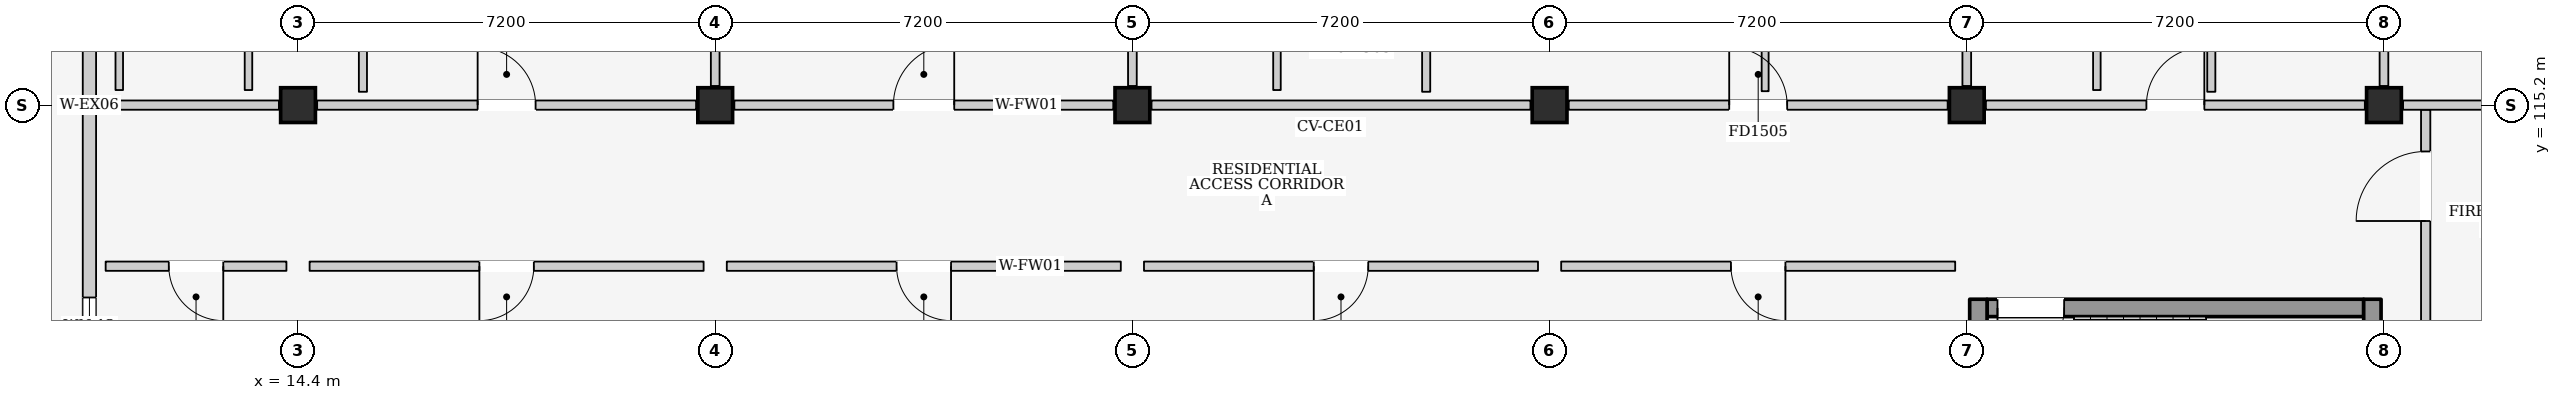
"""IFC4 building model, lengths in metres.
Left out: names, types, materials, properties, quantities, classifications, styles, units other than length and angle.
Written with IfcOpenShell. Run it as: python <this file> out.ifc"""

import sys

from ifc_helpers import new_model, si_unit, direction, frame, frame_2d, origin, origin_2d, place, context, subcontext, project, spatial, rectangle, extrude, element, fill, save


model = new_model("IFC4")
c1 = context("Model", 3, precision=1e-05, world=origin(), true_north=direction((0.0, 1.0)))
c2 = subcontext(c1, "Body", "Model", "MODEL_VIEW")
j1 = project(units=[si_unit("LENGTHUNIT", "METRE"), si_unit("PLANEANGLEUNIT", "RADIAN")], contexts=[c1])
p1 = place(None, origin())
s1 = spatial("IfcSite", under=j1, at=p1, CompositionType="ELEMENT")
p2 = place(p1, origin())
s2 = spatial("IfcBuilding", under=s1, at=p2, CompositionType="ELEMENT")
p3 = place(p2, frame((0.0, 0.0, 25.1)))
s3 = spatial("IfcBuildingStorey", under=s2, at=p3, CompositionType="ELEMENT", Elevation=25.1)
for number, where, z_axis, x_axis in (
    (1, (14.4, 115.2, 0.0), (0.0, 0.0, 1.0), (1.0, 0.0, 0.0)),
    (2, (21.6, 115.2, 0.0), (0.0, 0.0, 1.0), (1.0, 0.0, 0.0)),
    (3, (28.8, 115.2, 0.0), (0.0, 0.0, 1.0), (1.0, 0.0, 0.0)),
    (4, (36.0, 115.2, 0.0), (0.0, 0.0, 1.0), (1.0, 0.0, 0.0)),
    (5, (43.2, 115.2, 0.0), (0.0, 0.0, 1.0), (1.0, 0.0, 0.0)),
    (6, (50.4, 115.2, 0.0), (0.0, 0.0, 1.0), (1.0, 0.0, 0.0)),
):
    element("IfcColumn", number, at=place(p3, frame(where, z_axis=z_axis, x_axis=x_axis)), inside=s3, PredefinedType="COLUMN", context=c2, shape_type="SweptSolid", body=[
        extrude(rectangle(XDim=0.6, YDim=0.6, at=origin_2d()), origin(), (0.0, 0.0, 1.0), 3.2),
    ])
p4 = place(p3, frame((10.8, 108.13, 0.0), z_axis=(0.0, 0.0, 1.0), x_axis=(0.0, 1.0, 0.0)))
e7 = element("IfcWall", 7, at=p4, inside=s3, PredefinedType="ELEMENTEDWALL", context=c2, shape_type="SweptSolid", body=[
    extrude(rectangle(XDim=7.07, YDim=0.23, at=frame_2d((3.535, 0.0))), origin(), (0.0, 0.0, 1.0), 2.425),
])
p5 = place(p4, frame((2.75, 0.0, 1.1)))
e8 = element("IfcOpeningElement", 8, at=p5, cuts=e7, PredefinedType="OPENING", context=c2, shape_type="SweptSolid", body=[
    extrude(rectangle(XDim=1.0, YDim=0.9, at=frame_2d((0.5, 0.45))), frame((0.0, 0.13, 0.0), z_axis=(0.0, -1.0, 0.0), x_axis=(1.0, 0.0, 0.0)), (0.0, 0.0, 1.0), 0.26),
])
p6 = place(p3, frame((10.8, 115.2, 0.0), z_axis=(0.0, 0.0, 1.0), x_axis=(0.0, 1.0, 0.0)))
e9 = element("IfcWall", 9, at=p6, inside=s3, PredefinedType="ELEMENTEDWALL", context=c2, shape_type="SweptSolid", body=[
    extrude(rectangle(XDim=7.07, YDim=0.23, at=frame_2d((3.535, 0.0))), origin(), (0.0, 0.0, 1.0), 2.425),
])
p7 = place(p6, frame((3.6, 0.0, 0.0)))
e10 = element("IfcOpeningElement", 10, at=p7, cuts=e9, PredefinedType="OPENING", context=c2, shape_type="SweptSolid", body=[
    extrude(rectangle(XDim=1.08, YDim=2.12, at=frame_2d((0.54, 1.06))), frame((0.0, 0.13, 0.0), z_axis=(0.0, -1.0, 0.0), x_axis=(1.0, 0.0, 0.0)), (0.0, 0.0, 1.0), 0.26),
])
p8 = place(p3, frame((43.55, 111.7, 0.0), z_axis=(0.0, 0.0, 1.0), x_axis=(1.0, 0.0, 0.0)))
e11 = element("IfcWall", 11, at=p8, inside=s3, PredefinedType="SHEAR", context=c2, shape_type="SweptSolid", body=[
    extrude(rectangle(XDim=6.5, YDim=0.3, at=frame_2d((3.25, 0.0))), origin(), (0.0, 0.0, 1.0), 2.99),
])
p9 = place(p8, frame((0.18, 0.0, 0.0)))
e12 = element("IfcOpeningElement", 12, at=p9, cuts=e11, PredefinedType="OPENING", context=c2, shape_type="SweptSolid", body=[
    extrude(rectangle(XDim=1.15, YDim=2.2, at=frame_2d((0.575, 1.1))), frame((0.0, 0.165, 0.0), z_axis=(0.0, -1.0, 0.0), x_axis=(1.0, 0.0, 0.0)), (0.0, 0.0, 1.0), 0.33),
])
for number, where, z_axis, x_axis in (
    (13, (43.4, 108.15, 0.0), (0.0, 0.0, 1.0), (0.0, 1.0, 0.0)),
    (14, (50.2, 108.15, 0.0), (0.0, 0.0, 1.0), (0.0, 1.0, 0.0)),
):
    element("IfcWall", number, at=place(p3, frame(where, z_axis=z_axis, x_axis=x_axis)), inside=s3, PredefinedType="SHEAR", context=c2, shape_type="SweptSolid", body=[
        extrude(rectangle(XDim=3.7, YDim=0.3, at=frame_2d((1.85, 0.0))), origin(), (0.0, 0.0, 1.0), 2.99),
    ])
p10 = place(p3, frame((51.12, 111.1, 0.0), z_axis=(0.0, 0.0, 1.0), x_axis=(0.0, 1.0, 0.0)))
e15 = element("IfcWall", 15, at=p10, inside=s3, PredefinedType="PARTITIONING", context=c2, shape_type="SweptSolid", body=[
    extrude(rectangle(XDim=4.02, YDim=0.16, at=frame_2d((2.01, 0.0))), origin(), (0.0, 0.0, 1.0), 2.99),
])
p11 = place(p10, frame((2.1, 0.0, 0.0)))
e16 = element("IfcOpeningElement", 16, at=p11, cuts=e15, PredefinedType="OPENING", context=c2, shape_type="SweptSolid", body=[
    extrude(rectangle(XDim=1.2, YDim=2.2, at=frame_2d((0.6, 1.1))), frame((0.0, 0.095, 0.0), z_axis=(0.0, -1.0, 0.0), x_axis=(1.0, 0.0, 0.0)), (0.0, 0.0, 1.0), 0.19),
])
p12 = place(p3, frame((11.08, 115.2, 0.0), z_axis=(0.0, 0.0, 1.0), x_axis=(1.0, 0.0, 0.0)))
e17 = element("IfcWall", 17, at=p12, inside=s3, PredefinedType="PARTITIONING", context=c2, shape_type="SweptSolid", body=[
    extrude(rectangle(XDim=2.99, YDim=0.16, at=frame_2d((1.495, 0.0))), origin(), (0.0, 0.0, 1.0), 2.325),
])
p13 = place(p3, frame((14.73, 115.2, 0.0), z_axis=(0.0, 0.0, 1.0), x_axis=(1.0, 0.0, 0.0)))
e18 = element("IfcWall", 18, at=p13, inside=s3, PredefinedType="PARTITIONING", context=c2, shape_type="SweptSolid", body=[
    extrude(rectangle(XDim=6.54, YDim=0.16, at=frame_2d((3.27, 0.0))), origin(), (0.0, 0.0, 1.0), 2.325),
])
p14 = place(p13, frame((2.77, 0.0, 0.0)))
e19 = element("IfcOpeningElement", 19, at=p14, cuts=e18, PredefinedType="OPENING", context=c2, shape_type="SweptSolid", body=[
    extrude(rectangle(XDim=1.0, YDim=2.15, at=frame_2d((0.5, 1.075))), frame((0.0, 0.095, 0.0), z_axis=(0.0, -1.0, 0.0), x_axis=(1.0, 0.0, 0.0)), (0.0, 0.0, 1.0), 0.19),
])
p15 = place(p3, frame((21.6, 115.53, 0.0), z_axis=(0.0, 0.0, 1.0), x_axis=(0.0, 1.0, 0.0)))
e20 = element("IfcWall", 20, at=p15, inside=s3, PredefinedType="PARTITIONING", context=c2, shape_type="SweptSolid", body=[
    extrude(rectangle(XDim=6.54, YDim=0.15, at=frame_2d((3.27, 0.0))), origin(), (0.0, 0.0, 1.0), 2.475),
])
for number, where, z_axis, x_axis in (
    (21, (13.545, 115.46, 0.0), (0.0, 0.0, 1.0), (0.0, 1.0, 0.0)),
    (22, (11.315, 115.46, 0.0), (0.0, 0.0, 1.0), (0.0, 1.0, 0.0)),
):
    element("IfcWall", number, at=place(p3, frame(where, z_axis=z_axis, x_axis=x_axis)), inside=s3, PredefinedType="PARTITIONING", context=c2, shape_type="SweptSolid", body=[
        extrude(rectangle(XDim=2.13, YDim=0.13, at=frame_2d((1.065, 0.0))), origin(), (0.0, 0.0, 1.0), 2.99),
    ])
p16 = place(p3, frame((15.52, 115.43, 0.0), z_axis=(0.0, 0.0, 1.0), x_axis=(0.0, 1.0, 0.0)))
e23 = element("IfcWall", 23, at=p16, inside=s3, PredefinedType="PARTITIONING", context=c2, shape_type="SweptSolid", body=[
    extrude(rectangle(XDim=2.15, YDim=0.14, at=frame_2d((1.075, 0.0))), origin(), (0.0, 0.0, 1.0), 2.99),
])
p17 = place(p3, frame((21.93, 115.2, 0.0), z_axis=(0.0, 0.0, 1.0), x_axis=(1.0, 0.0, 0.0)))
e24 = element("IfcWall", 24, at=p17, inside=s3, PredefinedType="PARTITIONING", context=c2, shape_type="SweptSolid", body=[
    extrude(rectangle(XDim=6.54, YDim=0.16, at=frame_2d((3.27, 0.0))), origin(), (0.0, 0.0, 1.0), 2.325),
])
p18 = place(p17, frame((2.745, 0.0, 0.0)))
e25 = element("IfcOpeningElement", 25, at=p18, cuts=e24, PredefinedType="OPENING", context=c2, shape_type="SweptSolid", body=[
    extrude(rectangle(XDim=1.05, YDim=2.2, at=frame_2d((0.525, 1.1))), frame((0.0, 0.095, 0.0), z_axis=(0.0, -1.0, 0.0), x_axis=(1.0, 0.0, 0.0)), (0.0, 0.0, 1.0), 0.19),
])
p19 = place(p3, frame((28.8, 115.53, 0.0), z_axis=(0.0, 0.0, 1.0), x_axis=(0.0, 1.0, 0.0)))
e26 = element("IfcWall", 26, at=p19, inside=s3, PredefinedType="PARTITIONING", context=c2, shape_type="SweptSolid", body=[
    extrude(rectangle(XDim=6.54, YDim=0.15, at=frame_2d((3.27, 0.0))), origin(), (0.0, 0.0, 1.0), 2.475),
])
p20 = place(p3, frame((29.13, 115.2, 0.0), z_axis=(0.0, 0.0, 1.0), x_axis=(1.0, 0.0, 0.0)))
e27 = element("IfcWall", 27, at=p20, inside=s3, PredefinedType="PARTITIONING", context=c2, shape_type="SweptSolid", body=[
    extrude(rectangle(XDim=6.54, YDim=0.16, at=frame_2d((3.27, 0.0))), origin(), (0.0, 0.0, 1.0), 2.325),
])
p21 = place(p3, frame((36.33, 115.2, 0.0), z_axis=(0.0, 0.0, 1.0), x_axis=(1.0, 0.0, 0.0)))
e28 = element("IfcWall", 28, at=p21, inside=s3, PredefinedType="PARTITIONING", context=c2, shape_type="SweptSolid", body=[
    extrude(rectangle(XDim=6.54, YDim=0.16, at=frame_2d((3.27, 0.0))), origin(), (0.0, 0.0, 1.0), 2.325),
])
p22 = place(p21, frame((2.77, 0.0, 0.0)))
e29 = element("IfcOpeningElement", 29, at=p22, cuts=e28, PredefinedType="OPENING", context=c2, shape_type="SweptSolid", body=[
    extrude(rectangle(XDim=1.0, YDim=2.15, at=frame_2d((0.5, 1.075))), frame((0.0, 0.095, 0.0), z_axis=(0.0, -1.0, 0.0), x_axis=(1.0, 0.0, 0.0)), (0.0, 0.0, 1.0), 0.19),
])
p23 = place(p3, frame((43.2, 115.53, 0.0), z_axis=(0.0, 0.0, 1.0), x_axis=(0.0, 1.0, 0.0)))
e30 = element("IfcWall", 30, at=p23, inside=s3, PredefinedType="PARTITIONING", context=c2, shape_type="SweptSolid", body=[
    extrude(rectangle(XDim=6.54, YDim=0.15, at=frame_2d((3.27, 0.0))), origin(), (0.0, 0.0, 1.0), 2.475),
])
p24 = place(p3, frame((31.295, 115.46, 0.0), z_axis=(0.0, 0.0, 1.0), x_axis=(0.0, 1.0, 0.0)))
e31 = element("IfcWall", 31, at=p24, inside=s3, PredefinedType="PARTITIONING", context=c2, shape_type="SweptSolid", body=[
    extrude(rectangle(XDim=3.04, YDim=0.13, at=frame_2d((1.52, 0.0))), origin(), (0.0, 0.0, 1.0), 2.99),
])
p25 = place(p3, frame((33.87, 115.43, 0.0), z_axis=(0.0, 0.0, 1.0), x_axis=(0.0, 1.0, 0.0)))
e32 = element("IfcWall", 32, at=p25, inside=s3, PredefinedType="PARTITIONING", context=c2, shape_type="SweptSolid", body=[
    extrude(rectangle(XDim=3.06, YDim=0.14, at=frame_2d((1.53, 0.0))), origin(), (0.0, 0.0, 1.0), 2.99),
])
p26 = place(p3, frame((39.72, 115.44, 0.0), z_axis=(0.0, 0.0, 1.0), x_axis=(0.0, 1.0, 0.0)))
e33 = element("IfcWall", 33, at=p26, inside=s3, PredefinedType="PARTITIONING", context=c2, shape_type="SweptSolid", body=[
    extrude(rectangle(XDim=3.04, YDim=0.12, at=frame_2d((1.52, 0.0))), origin(), (0.0, 0.0, 1.0), 2.99),
])
p27 = place(p26, frame((1.04, 0.0, 0.0)))
e34 = element("IfcOpeningElement", 34, at=p27, cuts=e33, PredefinedType="OPENING", context=c2, shape_type="SweptSolid", body=[
    extrude(rectangle(XDim=0.96, YDim=2.15, at=frame_2d((0.48, 1.075))), frame((0.0, 0.075, 0.0), z_axis=(0.0, -1.0, 0.0), x_axis=(1.0, 0.0, 0.0)), (0.0, 0.0, 1.0), 0.15),
])
p28 = place(p3, frame((43.53, 115.2, 0.0), z_axis=(0.0, 0.0, 1.0), x_axis=(1.0, 0.0, 0.0)))
e35 = element("IfcWall", 35, at=p28, inside=s3, PredefinedType="PARTITIONING", context=c2, shape_type="SweptSolid", body=[
    extrude(rectangle(XDim=6.54, YDim=0.16, at=frame_2d((3.27, 0.0))), origin(), (0.0, 0.0, 1.0), 2.325),
])
p29 = place(p28, frame((2.77, 0.0, 0.0)))
e36 = element("IfcOpeningElement", 36, at=p29, cuts=e35, PredefinedType="OPENING", context=c2, shape_type="SweptSolid", body=[
    extrude(rectangle(XDim=1.0, YDim=2.15, at=frame_2d((0.5, 1.075))), frame((0.0, 0.095, 0.0), z_axis=(0.0, -1.0, 0.0), x_axis=(1.0, 0.0, 0.0)), (0.0, 0.0, 1.0), 0.19),
])
p30 = place(p3, frame((50.4, 115.53, 0.0), z_axis=(0.0, 0.0, 1.0), x_axis=(0.0, 1.0, 0.0)))
e37 = element("IfcWall", 37, at=p30, inside=s3, PredefinedType="PARTITIONING", context=c2, shape_type="SweptSolid", body=[
    extrude(rectangle(XDim=6.54, YDim=0.15, at=frame_2d((3.27, 0.0))), origin(), (0.0, 0.0, 1.0), 2.475),
])
p31 = place(p3, frame((45.445, 115.46, 0.0), z_axis=(0.0, 0.0, 1.0), x_axis=(0.0, 1.0, 0.0)))
e38 = element("IfcWall", 38, at=p31, inside=s3, PredefinedType="PARTITIONING", context=c2, shape_type="SweptSolid", body=[
    extrude(rectangle(XDim=2.13, YDim=0.13, at=frame_2d((1.065, 0.0))), origin(), (0.0, 0.0, 1.0), 2.99),
])
p32 = place(p3, frame((47.42, 115.43, 0.0), z_axis=(0.0, 0.0, 1.0), x_axis=(0.0, 1.0, 0.0)))
e39 = element("IfcWall", 39, at=p32, inside=s3, PredefinedType="PARTITIONING", context=c2, shape_type="SweptSolid", body=[
    extrude(rectangle(XDim=2.15, YDim=0.14, at=frame_2d((1.075, 0.0))), origin(), (0.0, 0.0, 1.0), 2.99),
])
p33 = place(p3, frame((50.73, 115.2, 0.0), z_axis=(0.0, 0.0, 1.0), x_axis=(1.0, 0.0, 0.0)))
e40 = element("IfcWall", 40, at=p33, inside=s3, PredefinedType="PARTITIONING", context=c2, shape_type="SweptSolid", body=[
    extrude(rectangle(XDim=6.54, YDim=0.16, at=frame_2d((3.27, 0.0))), origin(), (0.0, 0.0, 1.0), 2.325),
])
p34 = place(p33, frame((2.77, 0.0, 0.0)))
e41 = element("IfcOpeningElement", 41, at=p34, cuts=e40, PredefinedType="OPENING", context=c2, shape_type="SweptSolid", body=[
    extrude(rectangle(XDim=1.0, YDim=2.15, at=frame_2d((0.5, 1.075))), frame((0.0, 0.095, 0.0), z_axis=(0.0, -1.0, 0.0), x_axis=(1.0, 0.0, 0.0)), (0.0, 0.0, 1.0), 0.19),
])
p35 = place(p3, frame((11.08, 112.42, 0.0), z_axis=(0.0, 0.0, 1.0), x_axis=(1.0, 0.0, 0.0)))
e42 = element("IfcWall", 42, at=p35, inside=s3, PredefinedType="PARTITIONING", context=c2, shape_type="SweptSolid", body=[
    extrude(rectangle(XDim=3.12, YDim=0.16, at=frame_2d((1.56, 0.0))), origin(), (0.0, 0.0, 1.0), 2.99),
])
p36 = place(p35, frame((1.09, 0.0, 0.0)))
e43 = element("IfcOpeningElement", 43, at=p36, cuts=e42, PredefinedType="OPENING", context=c2, shape_type="SweptSolid", body=[
    extrude(rectangle(XDim=0.94, YDim=2.12, at=frame_2d((0.47, 1.06))), frame((0.0, 0.095, 0.0), z_axis=(0.0, -1.0, 0.0), x_axis=(1.0, 0.0, 0.0)), (0.0, 0.0, 1.0), 0.19),
])
p37 = place(p3, frame((14.6, 112.42, 0.0), z_axis=(0.0, 0.0, 1.0), x_axis=(1.0, 0.0, 0.0)))
e44 = element("IfcWall", 44, at=p37, inside=s3, PredefinedType="PARTITIONING", context=c2, shape_type="SweptSolid", body=[
    extrude(rectangle(XDim=6.8, YDim=0.16, at=frame_2d((3.4, 0.0))), origin(), (0.0, 0.0, 1.0), 2.99),
])
p38 = place(p37, frame((2.93, 0.0, 0.0)))
e45 = element("IfcOpeningElement", 45, at=p38, cuts=e44, PredefinedType="OPENING", context=c2, shape_type="SweptSolid", body=[
    extrude(rectangle(XDim=0.94, YDim=2.12, at=frame_2d((0.47, 1.06))), frame((0.0, 0.095, 0.0), z_axis=(0.0, -1.0, 0.0), x_axis=(1.0, 0.0, 0.0)), (0.0, 0.0, 1.0), 0.19),
])
p39 = place(p3, frame((21.8, 112.42, 0.0), z_axis=(0.0, 0.0, 1.0), x_axis=(1.0, 0.0, 0.0)))
e46 = element("IfcWall", 46, at=p39, inside=s3, PredefinedType="PARTITIONING", context=c2, shape_type="SweptSolid", body=[
    extrude(rectangle(XDim=6.8, YDim=0.16, at=frame_2d((3.4, 0.0))), origin(), (0.0, 0.0, 1.0), 2.99),
])
p40 = place(p39, frame((2.93, 0.0, 0.0)))
e47 = element("IfcOpeningElement", 47, at=p40, cuts=e46, PredefinedType="OPENING", context=c2, shape_type="SweptSolid", body=[
    extrude(rectangle(XDim=0.94, YDim=2.12, at=frame_2d((0.47, 1.06))), frame((0.0, 0.095, 0.0), z_axis=(0.0, -1.0, 0.0), x_axis=(1.0, 0.0, 0.0)), (0.0, 0.0, 1.0), 0.19),
])
p41 = place(p3, frame((29.0, 112.42, 0.0), z_axis=(0.0, 0.0, 1.0), x_axis=(1.0, 0.0, 0.0)))
e48 = element("IfcWall", 48, at=p41, inside=s3, PredefinedType="PARTITIONING", context=c2, shape_type="SweptSolid", body=[
    extrude(rectangle(XDim=6.8, YDim=0.16, at=frame_2d((3.4, 0.0))), origin(), (0.0, 0.0, 1.0), 2.99),
])
p42 = place(p41, frame((2.93, 0.0, 0.0)))
e49 = element("IfcOpeningElement", 49, at=p42, cuts=e48, PredefinedType="OPENING", context=c2, shape_type="SweptSolid", body=[
    extrude(rectangle(XDim=0.94, YDim=2.12, at=frame_2d((0.47, 1.06))), frame((0.0, 0.095, 0.0), z_axis=(0.0, -1.0, 0.0), x_axis=(1.0, 0.0, 0.0)), (0.0, 0.0, 1.0), 0.19),
])
p43 = place(p3, frame((36.2, 112.42, 0.0), z_axis=(0.0, 0.0, 1.0), x_axis=(1.0, 0.0, 0.0)))
e50 = element("IfcWall", 50, at=p43, inside=s3, PredefinedType="PARTITIONING", context=c2, shape_type="SweptSolid", body=[
    extrude(rectangle(XDim=6.8, YDim=0.16, at=frame_2d((3.4, 0.0))), origin(), (0.0, 0.0, 1.0), 2.99),
])
p44 = place(p43, frame((2.93, 0.0, 0.0)))
e51 = element("IfcOpeningElement", 51, at=p44, cuts=e50, PredefinedType="OPENING", context=c2, shape_type="SweptSolid", body=[
    extrude(rectangle(XDim=0.94, YDim=2.12, at=frame_2d((0.47, 1.06))), frame((0.0, 0.095, 0.0), z_axis=(0.0, -1.0, 0.0), x_axis=(1.0, 0.0, 0.0)), (0.0, 0.0, 1.0), 0.19),
])
p45 = place(p5, origin())
e52 = element("IfcWindow", 52, at=p45, inside=s3, PartitioningType="SINGLE_PANEL", PredefinedType="WINDOW", context=c2, shape_type="SweptSolid", body=[
    extrude(rectangle(XDim=1.0, YDim=0.9, at=frame_2d((0.5, 0.45))), frame((0.0, 0.03, 0.0), z_axis=(0.0, -1.0, 0.0), x_axis=(1.0, 0.0, 0.0)), (0.0, 0.0, 1.0), 0.06),
])
fill(e8, e52)
p46 = place(p9, frame((1.15, 0.0, 0.0), z_axis=(0.0, 0.0, 1.0), x_axis=(-1.0, 0.0, 0.0)))
e53 = element("IfcDoor", 53, at=p46, inside=s3, OperationType="SINGLE_SWING_RIGHT", PredefinedType="DOOR", context=c2, shape_type="SweptSolid", body=[
    extrude(rectangle(XDim=1.15, YDim=2.2, at=frame_2d((0.575, 1.1))), frame((0.0, 0.025, 0.0), z_axis=(0.0, -1.0, 0.0), x_axis=(1.0, 0.0, 0.0)), (0.0, 0.0, 1.0), 0.05),
])
fill(e12, e53)
p47 = place(p11, origin())
e54 = element("IfcDoor", 54, at=p47, inside=s3, OperationType="SINGLE_SWING_LEFT", PredefinedType="DOOR", context=c2, shape_type="SweptSolid", body=[
    extrude(rectangle(XDim=1.2, YDim=2.2, at=frame_2d((0.6, 1.1))), frame((0.0, 0.025, 0.0), z_axis=(0.0, -1.0, 0.0), x_axis=(1.0, 0.0, 0.0)), (0.0, 0.0, 1.0), 0.05),
])
fill(e16, e54)
p48 = place(p14, origin())
e55 = element("IfcDoor", 55, at=p48, inside=s3, OperationType="SINGLE_SWING_LEFT", PredefinedType="DOOR", context=c2, shape_type="SweptSolid", body=[
    extrude(rectangle(XDim=1.0, YDim=2.15, at=frame_2d((0.5, 1.075))), frame((0.0, 0.025, 0.0), z_axis=(0.0, -1.0, 0.0), x_axis=(1.0, 0.0, 0.0)), (0.0, 0.0, 1.0), 0.05),
])
fill(e19, e55)
p49 = place(p18, origin())
e56 = element("IfcDoor", 56, at=p49, inside=s3, OperationType="SINGLE_SWING_RIGHT", PredefinedType="DOOR", context=c2, shape_type="SweptSolid", body=[
    extrude(rectangle(XDim=1.05, YDim=2.2, at=frame_2d((0.525, 1.1))), frame((0.0, 0.025, 0.0), z_axis=(0.0, -1.0, 0.0), x_axis=(1.0, 0.0, 0.0)), (0.0, 0.0, 1.0), 0.05),
])
fill(e25, e56)
p50 = place(p22, origin())
e57 = element("IfcDoor", 57, at=p50, inside=s3, OperationType="SINGLE_SWING_LEFT", PredefinedType="DOOR", context=c2, shape_type="SweptSolid", body=[
    extrude(rectangle(XDim=1.0, YDim=2.15, at=frame_2d((0.5, 1.075))), frame((0.0, 0.025, 0.0), z_axis=(0.0, -1.0, 0.0), x_axis=(1.0, 0.0, 0.0)), (0.0, 0.0, 1.0), 0.05),
])
fill(e29, e57)
p51 = place(p29, origin())
e58 = element("IfcDoor", 58, at=p51, inside=s3, OperationType="SINGLE_SWING_RIGHT", PredefinedType="DOOR", context=c2, shape_type="SweptSolid", body=[
    extrude(rectangle(XDim=1.0, YDim=2.15, at=frame_2d((0.5, 1.075))), frame((0.0, 0.025, 0.0), z_axis=(0.0, -1.0, 0.0), x_axis=(1.0, 0.0, 0.0)), (0.0, 0.0, 1.0), 0.05),
])
fill(e36, e58)
p52 = place(p36, frame((0.94, 0.0, 0.0), z_axis=(0.0, 0.0, 1.0), x_axis=(-1.0, 0.0, 0.0)))
e59 = element("IfcDoor", 59, at=p52, inside=s3, OperationType="SINGLE_SWING_LEFT", PredefinedType="DOOR", context=c2, shape_type="SweptSolid", body=[
    extrude(rectangle(XDim=0.94, YDim=2.12, at=frame_2d((0.47, 1.06))), frame((0.0, 0.025, 0.0), z_axis=(0.0, -1.0, 0.0), x_axis=(1.0, 0.0, 0.0)), (0.0, 0.0, 1.0), 0.05),
])
fill(e43, e59)
p53 = place(p38, frame((0.94, 0.0, 0.0), z_axis=(0.0, 0.0, 1.0), x_axis=(-1.0, 0.0, 0.0)))
e60 = element("IfcDoor", 60, at=p53, inside=s3, OperationType="SINGLE_SWING_RIGHT", PredefinedType="DOOR", context=c2, shape_type="SweptSolid", body=[
    extrude(rectangle(XDim=0.94, YDim=2.12, at=frame_2d((0.47, 1.06))), frame((0.0, 0.025, 0.0), z_axis=(0.0, -1.0, 0.0), x_axis=(1.0, 0.0, 0.0)), (0.0, 0.0, 1.0), 0.05),
])
fill(e45, e60)
p54 = place(p40, frame((0.94, 0.0, 0.0), z_axis=(0.0, 0.0, 1.0), x_axis=(-1.0, 0.0, 0.0)))
e61 = element("IfcDoor", 61, at=p54, inside=s3, OperationType="SINGLE_SWING_LEFT", PredefinedType="DOOR", context=c2, shape_type="SweptSolid", body=[
    extrude(rectangle(XDim=0.94, YDim=2.12, at=frame_2d((0.47, 1.06))), frame((0.0, 0.025, 0.0), z_axis=(0.0, -1.0, 0.0), x_axis=(1.0, 0.0, 0.0)), (0.0, 0.0, 1.0), 0.05),
])
fill(e47, e61)
p55 = place(p42, frame((0.94, 0.0, 0.0), z_axis=(0.0, 0.0, 1.0), x_axis=(-1.0, 0.0, 0.0)))
e62 = element("IfcDoor", 62, at=p55, inside=s3, OperationType="SINGLE_SWING_RIGHT", PredefinedType="DOOR", context=c2, shape_type="SweptSolid", body=[
    extrude(rectangle(XDim=0.94, YDim=2.12, at=frame_2d((0.47, 1.06))), frame((0.0, 0.025, 0.0), z_axis=(0.0, -1.0, 0.0), x_axis=(1.0, 0.0, 0.0)), (0.0, 0.0, 1.0), 0.05),
])
fill(e49, e62)
p56 = place(p44, frame((0.94, 0.0, 0.0), z_axis=(0.0, 0.0, 1.0), x_axis=(-1.0, 0.0, 0.0)))
e63 = element("IfcDoor", 63, at=p56, inside=s3, OperationType="SINGLE_SWING_LEFT", PredefinedType="DOOR", context=c2, shape_type="SweptSolid", body=[
    extrude(rectangle(XDim=0.94, YDim=2.12, at=frame_2d((0.47, 1.06))), frame((0.0, 0.025, 0.0), z_axis=(0.0, -1.0, 0.0), x_axis=(1.0, 0.0, 0.0)), (0.0, 0.0, 1.0), 0.05),
])
fill(e51, e63)
save(model, sys.argv[1])
